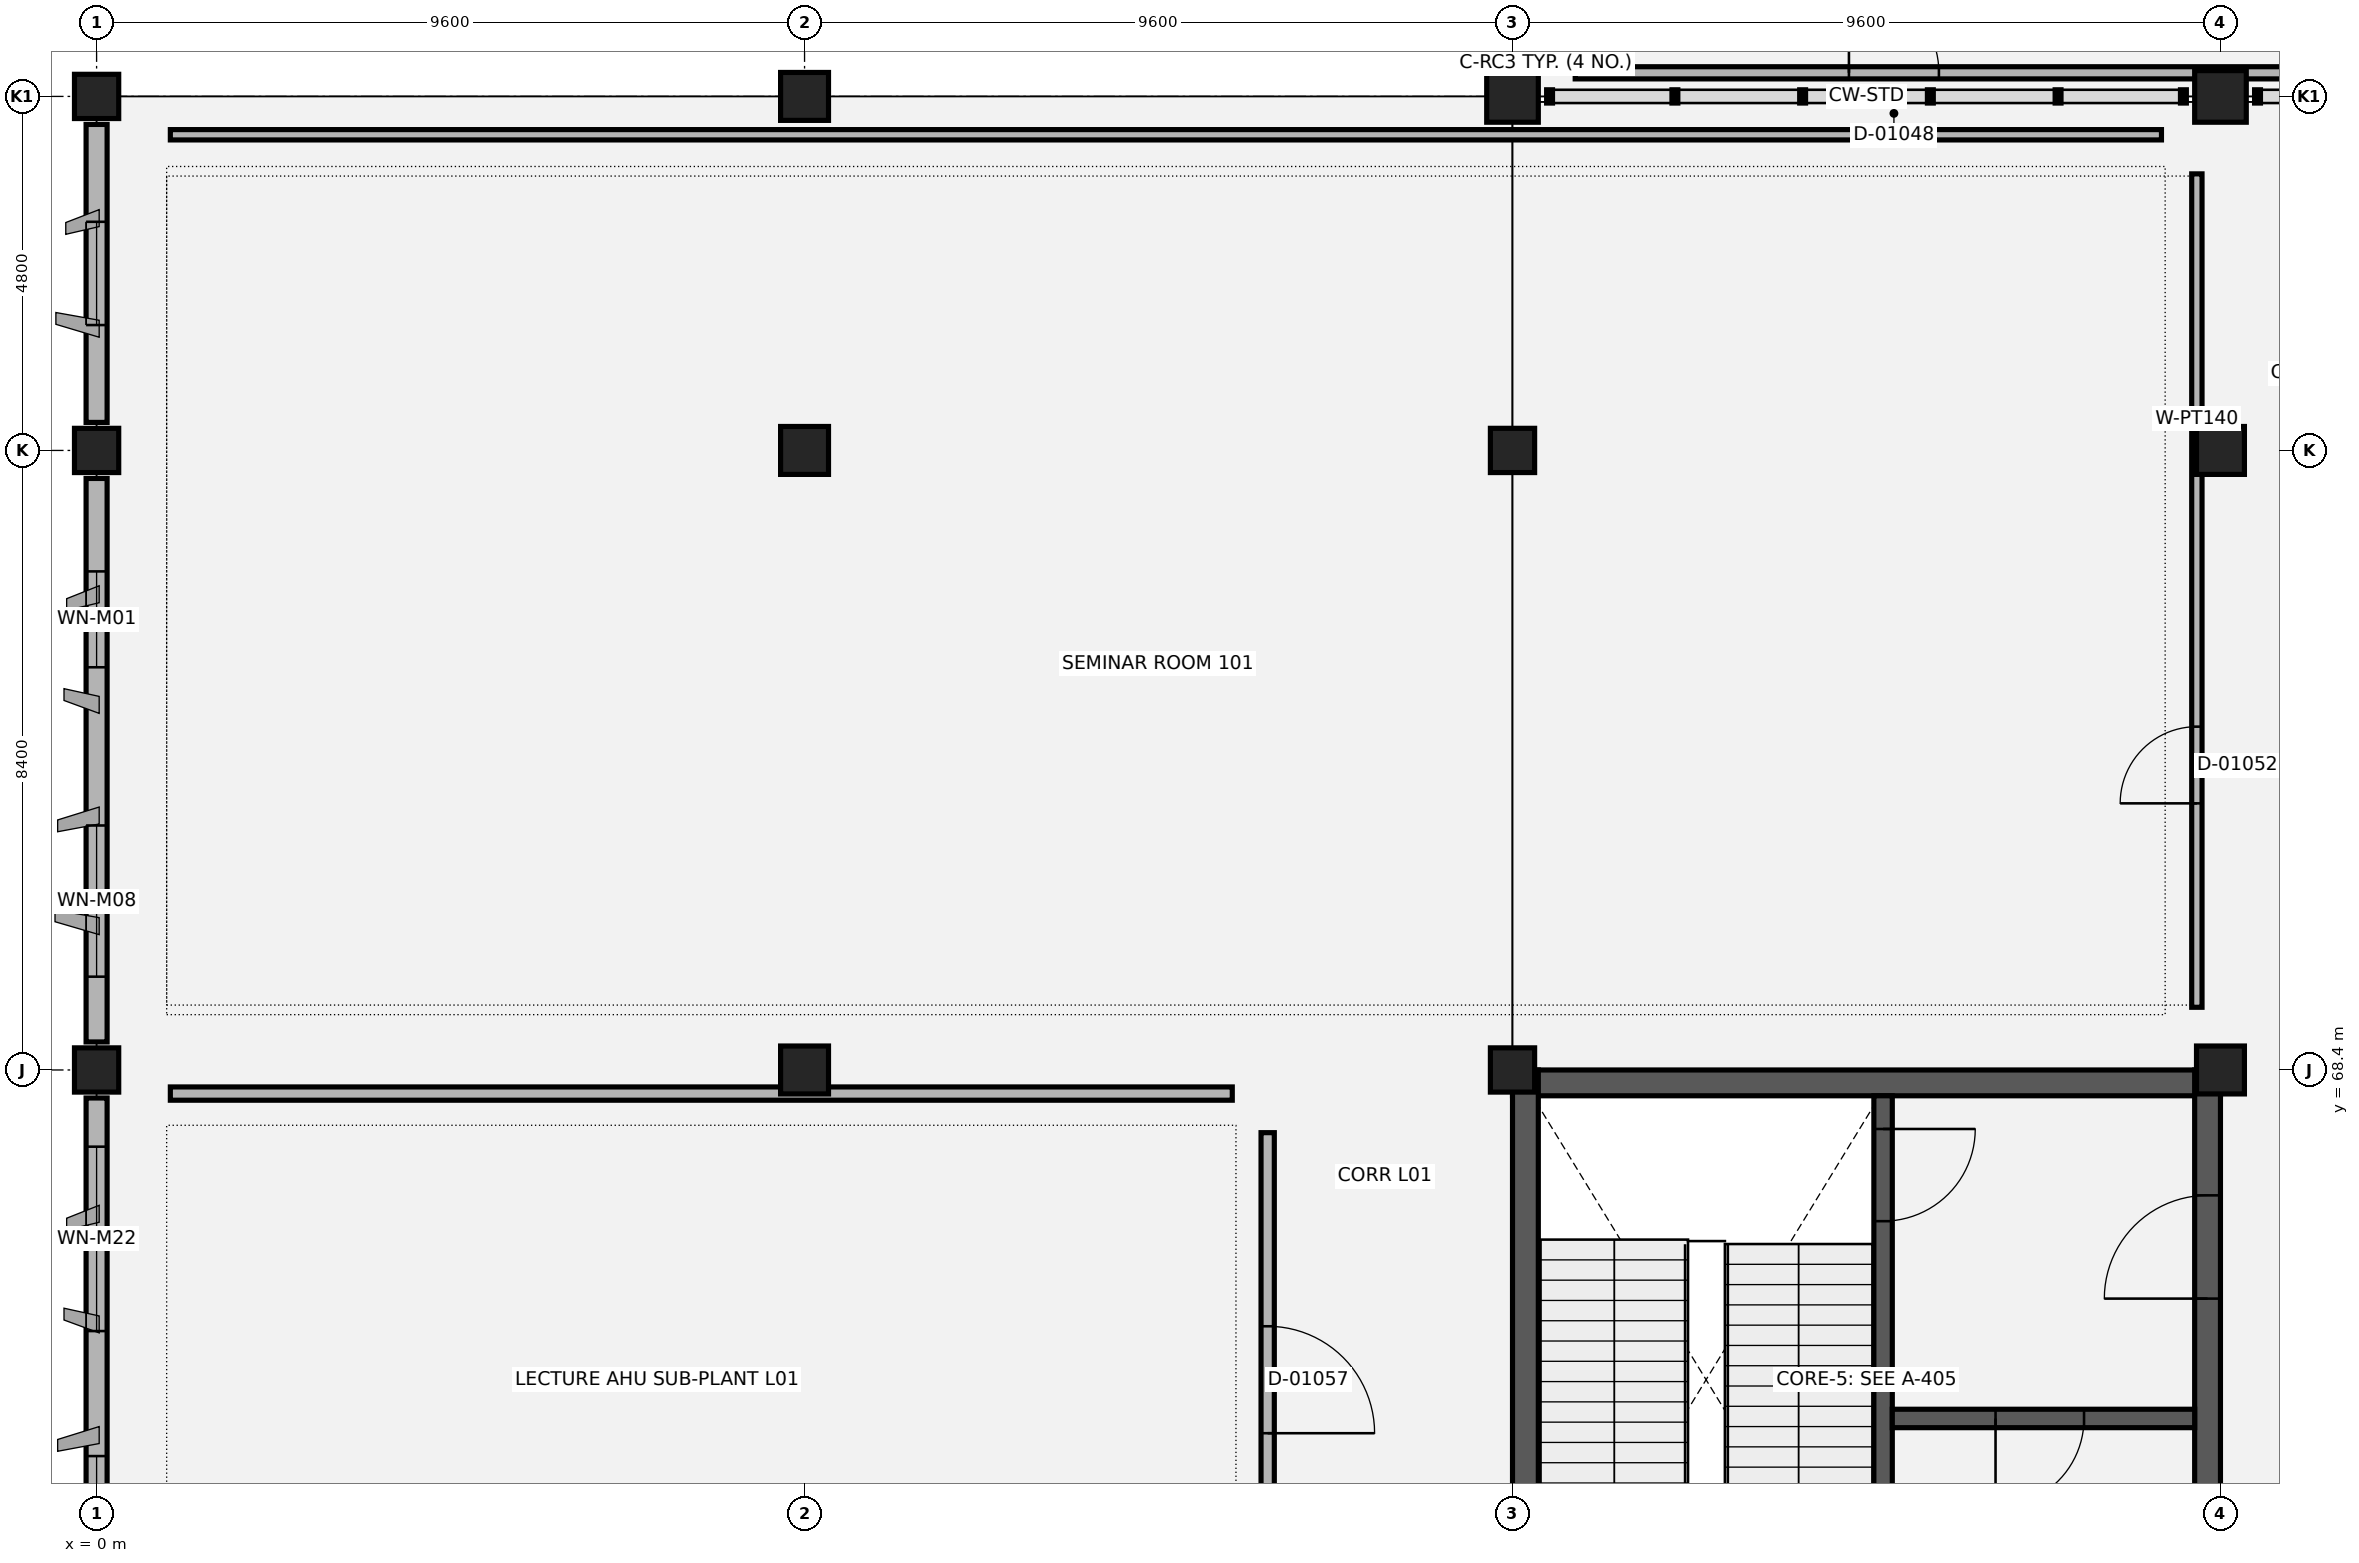
"""IFC4 building model, lengths in metres.
Left out: names, types, materials, properties, quantities, classifications, styles, units other than length and angle.
Written with IfcOpenShell. Run it as: python <this file> out.ifc"""

import sys

from ifc_helpers import new_model, si_unit, direction, frame, frame_2d, origin, origin_2d, place, context, subcontext, project, spatial, rectangle, extrude, element, fill, save


model = new_model("IFC4")
c1 = context("Model", 3, precision=1e-05, world=origin(), true_north=direction((0.0, 1.0)))
c2 = subcontext(c1, "Body", "Model", "MODEL_VIEW")
j1 = project(units=[si_unit("LENGTHUNIT", "METRE"), si_unit("PLANEANGLEUNIT", "RADIAN")], contexts=[c1])
p1 = place(None, origin())
s1 = spatial("IfcSite", under=j1, at=p1, CompositionType="ELEMENT")
p2 = place(p1, origin())
s2 = spatial("IfcBuilding", under=s1, at=p2, CompositionType="ELEMENT")
p3 = place(p2, frame((0.0, 0.0, 5.4)))
s3 = spatial("IfcBuildingStorey", under=s2, at=p3, CompositionType="ELEMENT", Elevation=5.4)
for number, where, z_axis, x_axis in (
    (1, (0.0, 68.4, 0.0), (0.0, 0.0, 1.0), (1.0, 0.0, 0.0)),
    (2, (0.0, 76.8, 0.0), (0.0, 0.0, 1.0), (1.0, 0.0, 0.0)),
    (3, (0.0, 81.6, 0.0), (0.0, 0.0, 1.0), (1.0, 0.0, 0.0)),
):
    element("IfcColumn", number, at=place(p3, frame(where, z_axis=z_axis, x_axis=x_axis)), inside=s3, PredefinedType="COLUMN", context=c2, shape_type="SweptSolid", body=[
        extrude(rectangle(XDim=0.6, YDim=0.6, at=origin_2d()), origin(), (0.0, 0.0, 1.0), 4.8),
    ])
for number, where, z_axis, x_axis in (
    (4, (9.6, 68.4, 0.0), (0.0, 0.0, 1.0), (1.0, 0.0, 0.0)),
    (5, (9.6, 76.8, 0.0), (0.0, 0.0, 1.0), (1.0, 0.0, 0.0)),
    (6, (9.6, 81.6, 0.0), (0.0, 0.0, 1.0), (1.0, 0.0, 0.0)),
):
    element("IfcColumn", number, at=place(p3, frame(where, z_axis=z_axis, x_axis=x_axis)), inside=s3, PredefinedType="COLUMN", context=c2, shape_type="SweptSolid", body=[
        extrude(rectangle(XDim=0.65, YDim=0.65, at=origin_2d()), origin(), (0.0, 0.0, 1.0), 4.8),
    ])
for number, where, z_axis, x_axis in (
    (7, (19.2, 68.4, 0.0), (0.0, 0.0, 1.0), (1.0, 0.0, 0.0)),
    (8, (19.2, 76.8, 0.0), (0.0, 0.0, 1.0), (1.0, 0.0, 0.0)),
):
    element("IfcColumn", number, at=place(p3, frame(where, z_axis=z_axis, x_axis=x_axis)), inside=s3, PredefinedType="COLUMN", context=c2, shape_type="SweptSolid", body=[
        extrude(rectangle(XDim=0.6, YDim=0.6, at=origin_2d()), origin(), (0.0, 0.0, 1.0), 4.8),
    ])
p4 = place(p3, frame((19.2, 81.6, 0.0), z_axis=(0.0, 0.0, 1.0), x_axis=(1.0, 0.0, 0.0)))
e9 = element("IfcColumn", 9, at=p4, inside=s3, PredefinedType="COLUMN", context=c2, shape_type="SweptSolid", body=[
    extrude(rectangle(XDim=0.7, YDim=0.7, at=origin_2d()), origin(), (0.0, 0.0, 1.0), 4.8),
])
for number, where, z_axis, x_axis in (
    (10, (28.8, 68.4, 0.0), (0.0, 0.0, 1.0), (1.0, 0.0, 0.0)),
    (11, (28.8, 76.8, 0.0), (0.0, 0.0, 1.0), (1.0, 0.0, 0.0)),
):
    element("IfcColumn", number, at=place(p3, frame(where, z_axis=z_axis, x_axis=x_axis)), inside=s3, PredefinedType="COLUMN", context=c2, shape_type="SweptSolid", body=[
        extrude(rectangle(XDim=0.65, YDim=0.65, at=origin_2d()), origin(), (0.0, 0.0, 1.0), 4.8),
    ])
p5 = place(p3, frame((28.8, 81.6, 0.0), z_axis=(0.0, 0.0, 1.0), x_axis=(1.0, 0.0, 0.0)))
e12 = element("IfcColumn", 12, at=p5, inside=s3, PredefinedType="COLUMN", context=c2, shape_type="SweptSolid", body=[
    extrude(rectangle(XDim=0.7, YDim=0.7, at=origin_2d()), origin(), (0.0, 0.0, 1.0), 4.8),
])
p6 = place(p3, frame((0.0, 68.02, 0.0), z_axis=(0.0, 0.0, 1.0), x_axis=(0.0, -1.0, 0.0)))
e13 = element("IfcWall", 13, at=p6, inside=s3, PredefinedType="SOLIDWALL", context=c2, shape_type="SweptSolid", body=[
    extrude(rectangle(XDim=7.64, YDim=0.285, at=frame_2d((3.82, 0.0))), origin(), (0.0, 0.0, 1.0), 3.28),
])
p7 = place(p6, frame((0.66, 0.0, 0.9)))
e14 = element("IfcOpeningElement", 14, at=p7, cuts=e13, PredefinedType="OPENING", context=c2, shape_type="SweptSolid", body=[
    extrude(rectangle(XDim=2.5, YDim=1.65, at=frame_2d((1.25, 0.825))), frame((0.0, 0.152, 0.0), z_axis=(0.0, -1.0, 0.0), x_axis=(1.0, 0.0, 0.0)), (0.0, 0.0, 1.0), 0.305),
])
p8 = place(p6, frame((4.855, 0.0, 0.9)))
e15 = element("IfcOpeningElement", 15, at=p8, cuts=e13, PredefinedType="OPENING", context=c2, shape_type="SweptSolid", body=[
    extrude(rectangle(XDim=1.75, YDim=1.55, at=frame_2d((0.875, 0.775))), frame((0.0, 0.152, 0.0), z_axis=(0.0, -1.0, 0.0), x_axis=(1.0, 0.0, 0.0)), (0.0, 0.0, 1.0), 0.305),
])
p9 = place(p3, frame((0.0, 76.42, 0.0), z_axis=(0.0, 0.0, 1.0), x_axis=(0.0, -1.0, 0.0)))
e16 = element("IfcWall", 16, at=p9, inside=s3, PredefinedType="SOLIDWALL", context=c2, shape_type="SweptSolid", body=[
    extrude(rectangle(XDim=7.64, YDim=0.285, at=frame_2d((3.82, 0.0))), origin(), (0.0, 0.0, 1.0), 3.28),
])
p10 = place(p9, frame((1.26, 0.0, 0.9)))
e17 = element("IfcOpeningElement", 17, at=p10, cuts=e16, PredefinedType="OPENING", context=c2, shape_type="SweptSolid", body=[
    extrude(rectangle(XDim=1.3, YDim=1.4, at=frame_2d((0.65, 0.7))), frame((0.0, 0.152, 0.0), z_axis=(0.0, -1.0, 0.0), x_axis=(1.0, 0.0, 0.0)), (0.0, 0.0, 1.0), 0.305),
])
p11 = place(p9, frame((4.705, 0.0, 0.9)))
e18 = element("IfcOpeningElement", 18, at=p11, cuts=e16, PredefinedType="OPENING", context=c2, shape_type="SweptSolid", body=[
    extrude(rectangle(XDim=2.05, YDim=1.6, at=frame_2d((1.025, 0.8))), frame((0.0, 0.152, 0.0), z_axis=(0.0, -1.0, 0.0), x_axis=(1.0, 0.0, 0.0)), (0.0, 0.0, 1.0), 0.305),
])
p12 = place(p3, frame((0.0, 81.22, 0.0), z_axis=(0.0, 0.0, 1.0), x_axis=(0.0, -1.0, 0.0)))
e19 = element("IfcWall", 19, at=p12, inside=s3, PredefinedType="SOLIDWALL", context=c2, shape_type="SweptSolid", body=[
    extrude(rectangle(XDim=4.04, YDim=0.285, at=frame_2d((2.02, 0.0))), origin(), (0.0, 0.0, 1.0), 3.28),
])
p13 = place(p12, frame((1.32, 0.0, 0.9)))
e20 = element("IfcOpeningElement", 20, at=p13, cuts=e19, PredefinedType="OPENING", context=c2, shape_type="SweptSolid", body=[
    extrude(rectangle(XDim=1.4, YDim=1.4, at=frame_2d((0.7, 0.7))), frame((0.0, 0.152, 0.0), z_axis=(0.0, -1.0, 0.0), x_axis=(1.0, 0.0, 0.0)), (0.0, 0.0, 1.0), 0.305),
])
p14 = place(p3, frame((19.2, 68.225, 0.0), z_axis=(0.0, 0.0, 1.0), x_axis=(1.0, 0.0, 0.0)))
e21 = element("IfcWall", 21, at=p14, inside=s3, PredefinedType="SHEAR", context=c2, shape_type="SweptSolid", body=[
    extrude(rectangle(XDim=9.6, YDim=0.35, at=frame_2d((4.8, 0.0))), origin(), (0.0, 0.0, 1.0), 4.48),
])
p15 = place(p3, frame((19.375, 60.0, 0.0), z_axis=(0.0, 0.0, 1.0), x_axis=(0.0, 1.0, 0.0)))
e22 = element("IfcWall", 22, at=p15, inside=s3, PredefinedType="SHEAR", context=c2, shape_type="SweptSolid", body=[
    extrude(rectangle(XDim=8.4, YDim=0.35, at=frame_2d((4.2, 0.0))), origin(), (0.0, 0.0, 1.0), 4.48),
])
p16 = place(p3, frame((28.625, 60.0, 0.0), z_axis=(0.0, 0.0, 1.0), x_axis=(0.0, 1.0, 0.0)))
e23 = element("IfcWall", 23, at=p16, inside=s3, PredefinedType="SHEAR", context=c2, shape_type="SweptSolid", body=[
    extrude(rectangle(XDim=8.4, YDim=0.35, at=frame_2d((4.2, 0.0))), origin(), (0.0, 0.0, 1.0), 4.48),
])
p17 = place(p16, frame((5.3, 0.0, 0.0)))
e24 = element("IfcOpeningElement", 24, at=p17, cuts=e23, PredefinedType="OPENING", context=c2, shape_type="SweptSolid", body=[
    extrude(rectangle(XDim=1.4, YDim=2.15, at=frame_2d((0.7, 1.075))), frame((0.0, 0.185, 0.0), z_axis=(0.0, -1.0, 0.0), x_axis=(1.0, 0.0, 0.0)), (0.0, 0.0, 1.0), 0.37),
])
p18 = place(p3, frame((24.225, 68.05, 0.0), z_axis=(0.0, 0.0, 1.0), x_axis=(0.0, -1.0, 0.0)))
e25 = element("IfcWall", 25, at=p18, inside=s3, PredefinedType="SHEAR", context=c2, shape_type="SweptSolid", body=[
    extrude(rectangle(XDim=7.7, YDim=0.25, at=frame_2d((3.85, 0.0))), origin(), (0.0, 0.0, 1.0), 4.48),
])
p19 = place(p18, frame((0.45, 0.0, 0.0)))
e26 = element("IfcOpeningElement", 26, at=p19, cuts=e25, PredefinedType="OPENING", context=c2, shape_type="SweptSolid", body=[
    extrude(rectangle(XDim=1.25, YDim=2.15, at=frame_2d((0.625, 1.075))), frame((0.0, 0.135, 0.0), z_axis=(0.0, -1.0, 0.0), x_axis=(1.0, 0.0, 0.0)), (0.0, 0.0, 1.0), 0.27),
])
p20 = place(p3, frame((24.35, 63.675, 0.0), z_axis=(0.0, 0.0, 1.0), x_axis=(1.0, 0.0, 0.0)))
e27 = element("IfcWall", 27, at=p20, inside=s3, PredefinedType="SHEAR", context=c2, shape_type="SweptSolid", body=[
    extrude(rectangle(XDim=4.1, YDim=0.25, at=frame_2d((2.05, 0.0))), origin(), (0.0, 0.0, 1.0), 4.48),
])
p21 = place(p20, frame((1.4, 0.0, 0.0)))
e28 = element("IfcOpeningElement", 28, at=p21, cuts=e27, PredefinedType="OPENING", context=c2, shape_type="SweptSolid", body=[
    extrude(rectangle(XDim=1.2, YDim=2.15, at=frame_2d((0.6, 1.075))), frame((0.0, 0.135, 0.0), z_axis=(0.0, -1.0, 0.0), x_axis=(1.0, 0.0, 0.0)), (0.0, 0.0, 1.0), 0.27),
])
p22 = place(p3, frame((20.05, 81.92, 0.0), z_axis=(0.0, 0.0, 1.0), x_axis=(1.0, 0.0, 0.0)))
e29 = element("IfcWall", 29, at=p22, inside=s3, PredefinedType="PARTITIONING", context=c2, shape_type="SweptSolid", body=[
    extrude(rectangle(XDim=24.1, YDim=0.165, at=frame_2d((12.05, 0.0))), origin(), (0.0, 0.0, 1.0), 3.26),
])
p23 = place(p22, frame((3.712, 0.0, 0.0)))
e30 = element("IfcOpeningElement", 30, at=p23, cuts=e29, PredefinedType="OPENING", context=c2, shape_type="SweptSolid", body=[
    extrude(rectangle(XDim=1.22, YDim=2.15, at=frame_2d((0.61, 1.075))), frame((0.0, 0.093, 0.0), z_axis=(0.0, -1.0, 0.0), x_axis=(1.0, 0.0, 0.0)), (0.0, 0.0, 1.0), 0.185),
])
p24 = place(p3, frame((28.48, 69.25, 0.0), z_axis=(0.0, 0.0, 1.0), x_axis=(0.0, 1.0, 0.0)))
e31 = element("IfcWall", 31, at=p24, inside=s3, PredefinedType="PARTITIONING", context=c2, shape_type="SweptSolid", body=[
    extrude(rectangle(XDim=11.3, YDim=0.14, at=frame_2d((5.65, 0.0))), origin(), (0.0, 0.0, 1.0), 3.26),
])
p25 = place(p24, frame((2.765, 0.0, 0.0)))
e32 = element("IfcOpeningElement", 32, at=p25, cuts=e31, PredefinedType="OPENING", context=c2, shape_type="SweptSolid", body=[
    extrude(rectangle(XDim=1.04, YDim=2.15, at=frame_2d((0.52, 1.075))), frame((0.0, 0.08, 0.0), z_axis=(0.0, -1.0, 0.0), x_axis=(1.0, 0.0, 0.0)), (0.0, 0.0, 1.0), 0.16),
])
p26 = place(p3, frame((1.0, 81.08, 0.0), z_axis=(0.0, 0.0, 1.0), x_axis=(1.0, 0.0, 0.0)))
e33 = element("IfcWall", 33, at=p26, inside=s3, PredefinedType="PARTITIONING", context=c2, shape_type="SweptSolid", body=[
    extrude(rectangle(XDim=27.0, YDim=0.14, at=frame_2d((13.5, 0.0))), origin(), (0.0, 0.0, 1.0), 3.26),
])
p27 = place(p3, frame((15.88, 60.85, 0.0), z_axis=(0.0, 0.0, 1.0), x_axis=(0.0, 1.0, 0.0)))
e34 = element("IfcWall", 34, at=p27, inside=s3, PredefinedType="PARTITIONING", context=c2, shape_type="SweptSolid", body=[
    extrude(rectangle(XDim=6.7, YDim=0.18, at=frame_2d((3.35, 0.0))), origin(), (0.0, 0.0, 1.0), 3.26),
])
p28 = place(p27, frame((2.625, 0.0, 0.0)))
e35 = element("IfcOpeningElement", 35, at=p28, cuts=e34, PredefinedType="OPENING", context=c2, shape_type="SweptSolid", body=[
    extrude(rectangle(XDim=1.45, YDim=2.15, at=frame_2d((0.725, 1.075))), frame((0.0, 0.1, 0.0), z_axis=(0.0, -1.0, 0.0), x_axis=(1.0, 0.0, 0.0)), (0.0, 0.0, 1.0), 0.2),
])
p29 = place(p3, frame((1.0, 68.08, 0.0), z_axis=(0.0, 0.0, 1.0), x_axis=(1.0, 0.0, 0.0)))
e36 = element("IfcWall", 36, at=p29, inside=s3, PredefinedType="PARTITIONING", context=c2, shape_type="SweptSolid", body=[
    extrude(rectangle(XDim=14.4, YDim=0.18, at=frame_2d((7.2, 0.0))), origin(), (0.0, 0.0, 1.0), 3.26),
])
p30 = place(p7, origin())
e37 = element("IfcWindow", 37, at=p30, inside=s3, PartitioningType="SINGLE_PANEL", PredefinedType="WINDOW", context=c2, shape_type="SweptSolid", body=[
    extrude(rectangle(XDim=2.5, YDim=1.65, at=frame_2d((1.25, 0.825))), frame((0.0, 0.03, 0.0), z_axis=(0.0, -1.0, 0.0), x_axis=(1.0, 0.0, 0.0)), (0.0, 0.0, 1.0), 0.06),
])
fill(e14, e37)
p31 = place(p8, origin())
e38 = element("IfcWindow", 38, at=p31, inside=s3, PartitioningType="SINGLE_PANEL", PredefinedType="WINDOW", context=c2, shape_type="SweptSolid", body=[
    extrude(rectangle(XDim=1.75, YDim=1.55, at=frame_2d((0.875, 0.775))), frame((0.0, 0.03, 0.0), z_axis=(0.0, -1.0, 0.0), x_axis=(1.0, 0.0, 0.0)), (0.0, 0.0, 1.0), 0.06),
])
fill(e15, e38)
p32 = place(p10, origin())
e39 = element("IfcWindow", 39, at=p32, inside=s3, PartitioningType="SINGLE_PANEL", PredefinedType="WINDOW", context=c2, shape_type="SweptSolid", body=[
    extrude(rectangle(XDim=1.3, YDim=1.4, at=frame_2d((0.65, 0.7))), frame((0.0, 0.03, 0.0), z_axis=(0.0, -1.0, 0.0), x_axis=(1.0, 0.0, 0.0)), (0.0, 0.0, 1.0), 0.06),
])
fill(e17, e39)
p33 = place(p11, origin())
e40 = element("IfcWindow", 40, at=p33, inside=s3, PartitioningType="SINGLE_PANEL", PredefinedType="WINDOW", context=c2, shape_type="SweptSolid", body=[
    extrude(rectangle(XDim=2.05, YDim=1.6, at=frame_2d((1.025, 0.8))), frame((0.0, 0.03, 0.0), z_axis=(0.0, -1.0, 0.0), x_axis=(1.0, 0.0, 0.0)), (0.0, 0.0, 1.0), 0.06),
])
fill(e18, e40)
p34 = place(p13, origin())
e41 = element("IfcWindow", 41, at=p34, inside=s3, PartitioningType="SINGLE_PANEL", PredefinedType="WINDOW", context=c2, shape_type="SweptSolid", body=[
    extrude(rectangle(XDim=1.4, YDim=1.4, at=frame_2d((0.7, 0.7))), frame((0.0, 0.03, 0.0), z_axis=(0.0, -1.0, 0.0), x_axis=(1.0, 0.0, 0.0)), (0.0, 0.0, 1.0), 0.06),
])
fill(e20, e41)
p35 = place(p19, origin())
e42 = element("IfcDoor", 42, at=p35, inside=s3, OperationType="SINGLE_SWING_LEFT", PredefinedType="DOOR", context=c2, shape_type="SweptSolid", body=[
    extrude(rectangle(XDim=1.25, YDim=2.15, at=frame_2d((0.625, 1.075))), frame((0.0, 0.025, 0.0), z_axis=(0.0, -1.0, 0.0), x_axis=(1.0, 0.0, 0.0)), (0.0, 0.0, 1.0), 0.05),
])
fill(e26, e42)
p36 = place(p21, origin())
e43 = element("IfcDoor", 43, at=p36, inside=s3, OperationType="SINGLE_SWING_RIGHT", PredefinedType="DOOR", context=c2, shape_type="SweptSolid", body=[
    extrude(rectangle(XDim=1.2, YDim=2.15, at=frame_2d((0.6, 1.075))), frame((0.0, 0.025, 0.0), z_axis=(0.0, -1.0, 0.0), x_axis=(1.0, 0.0, 0.0)), (0.0, 0.0, 1.0), 0.05),
])
fill(e28, e43)
p37 = place(p17, origin())
e44 = element("IfcDoor", 44, at=p37, inside=s3, OperationType="SINGLE_SWING_LEFT", PredefinedType="DOOR", context=c2, shape_type="SweptSolid", body=[
    extrude(rectangle(XDim=1.4, YDim=2.15, at=frame_2d((0.7, 1.075))), frame((0.0, 0.025, 0.0), z_axis=(0.0, -1.0, 0.0), x_axis=(1.0, 0.0, 0.0)), (0.0, 0.0, 1.0), 0.05),
])
fill(e24, e44)
p38 = place(p23, origin())
e45 = element("IfcDoor", 45, at=p38, inside=s3, OperationType="SINGLE_SWING_LEFT", PredefinedType="DOOR", context=c2, shape_type="SweptSolid", body=[
    extrude(rectangle(XDim=1.22, YDim=2.15, at=frame_2d((0.61, 1.075))), frame((0.0, 0.025, 0.0), z_axis=(0.0, -1.0, 0.0), x_axis=(1.0, 0.0, 0.0)), (0.0, 0.0, 1.0), 0.05),
])
fill(e30, e45)
p39 = place(p25, origin())
e46 = element("IfcDoor", 46, at=p39, inside=s3, OperationType="SINGLE_SWING_LEFT", PredefinedType="DOOR", context=c2, shape_type="SweptSolid", body=[
    extrude(rectangle(XDim=1.04, YDim=2.15, at=frame_2d((0.52, 1.075))), frame((0.0, 0.025, 0.0), z_axis=(0.0, -1.0, 0.0), x_axis=(1.0, 0.0, 0.0)), (0.0, 0.0, 1.0), 0.05),
])
fill(e32, e46)
p40 = place(p28, origin())
e47 = element("IfcDoor", 47, at=p40, inside=s3, OperationType="SINGLE_SWING_RIGHT", PredefinedType="DOOR", context=c2, shape_type="SweptSolid", body=[
    extrude(rectangle(XDim=1.45, YDim=2.15, at=frame_2d((0.725, 1.075))), frame((0.0, 0.025, 0.0), z_axis=(0.0, -1.0, 0.0), x_axis=(1.0, 0.0, 0.0)), (0.0, 0.0, 1.0), 0.05),
])
fill(e35, e47)
save(model, sys.argv[1])
